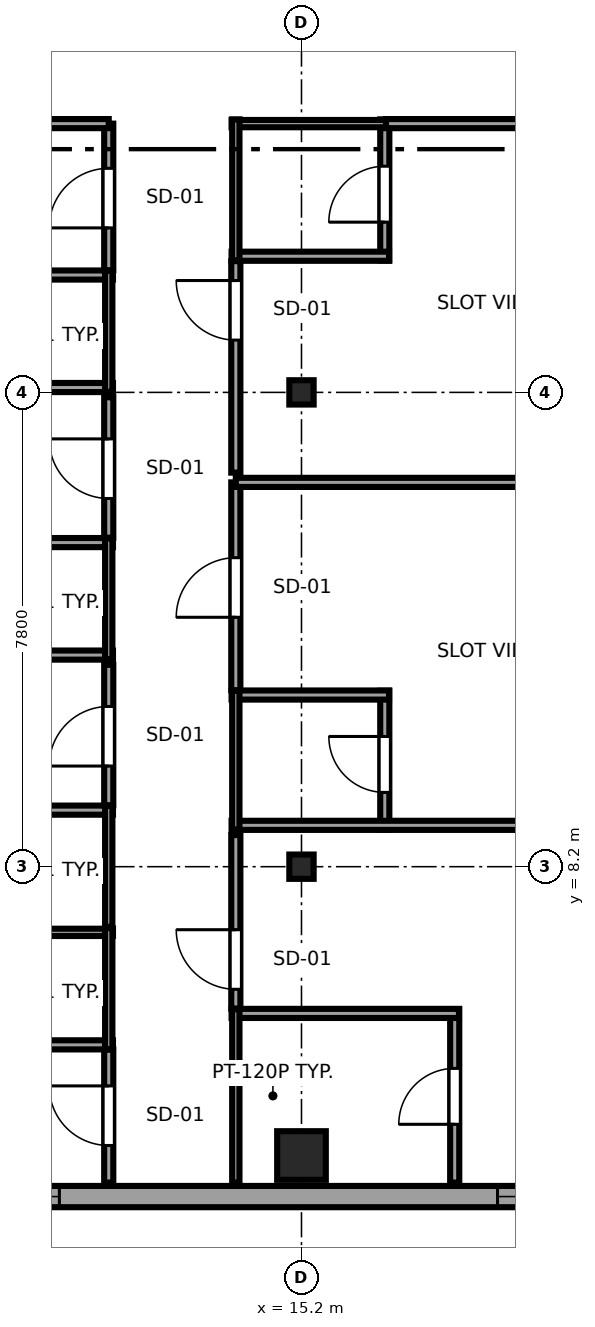
"""IFC4 building model, lengths in metres.
Left out: names, types, materials, properties, quantities, classifications, styles, units other than length and angle.
Written with IfcOpenShell. Run it as: python <this file> out.ifc"""

import sys

from ifc_helpers import new_model, si_unit, direction, frame, frame_2d, origin, origin_2d, place, context, subcontext, project, spatial, rectangle, i_section, extrude, source, transform, mapped, element, fill, save


model = new_model("IFC4")
c1 = context("Model", 3, precision=1e-05, world=origin(), true_north=direction((0.0, 1.0)))
c2 = subcontext(c1, "Body", "Model", "MODEL_VIEW")
j1 = project(units=[si_unit("LENGTHUNIT", "METRE"), si_unit("PLANEANGLEUNIT", "RADIAN")], contexts=[c1])
p1 = place(None, origin())
s1 = spatial("IfcSite", under=j1, at=p1, CompositionType="ELEMENT")
p2 = place(p1, origin())
s2 = spatial("IfcBuilding", under=s1, at=p2, CompositionType="ELEMENT")
p3 = place(p2, frame((0.0, 0.0, 187.55)))
s3 = spatial("IfcBuildingStorey", under=s2, at=p3, CompositionType="ELEMENT", Elevation=187.55)
m1 = source(origin(), c2, "Body", "SweptSolid", [
    extrude(rectangle(XDim=0.8, YDim=0.8, at=origin_2d()), origin(), (0.0, 0.0, 1.0), 3.55),
])
p4 = place(p3, frame((15.2, 3.45, 0.0), z_axis=(0.0, 0.0, 1.0), x_axis=(1.0, 0.0, 0.0)))
e1 = element("IfcColumn", 1, at=p4, inside=s3, PredefinedType="COLUMN", context=c2, shape_type="MappedRepresentation", body=[
    mapped(m1, transform((0.0, 0.0, 0.0), x_axis=(1.0, 0.0, 0.0), y_axis=(0.0, 1.0, 0.0), z_axis=(0.0, 0.0, 1.0), scale=1.0)),
])
m2 = source(origin(), c2, "Body", "SweptSolid", [
    extrude(i_section(OverallWidth=0.4, OverallDepth=0.4, WebThickness=0.02, FlangeThickness=0.035, at=origin_2d()), origin(), (0.0, 0.0, 1.0), 3.55),
])
for number, where, z_axis, x_axis in (
    (2, (15.2, 8.2, 0.0), (0.0, 0.0, 1.0), (1.0, 0.0, 0.0)),
    (3, (15.2, 16.0, 0.0), (0.0, 0.0, 1.0), (1.0, 0.0, 0.0)),
):
    element("IfcColumn", number, at=place(p3, frame(where, z_axis=z_axis, x_axis=x_axis)), inside=s3, PredefinedType="COLUMN", context=c2, shape_type="MappedRepresentation", body=[
        mapped(m2, transform((0.0, 0.0, 0.0), x_axis=(1.0, 0.0, 0.0), y_axis=(0.0, 1.0, 0.0), z_axis=(0.0, 0.0, 1.0), scale=1.0)),
    ])
p5 = place(p3, frame((7.017, 2.775, 0.0), z_axis=(0.0, 0.0, 1.0), x_axis=(1.0, 0.0, 0.0)))
e4 = element("IfcWall", 4, at=p5, inside=s3, PredefinedType="SOLIDWALL", context=c2, shape_type="SweptSolid", body=[
    extrude(rectangle(XDim=15.608, YDim=0.35, at=frame_2d((7.804, 0.0))), origin(), (0.0, 0.0, 1.0), 3.37),
])
p6 = place(p5, frame((1.801, 0.0, 0.68)))
e5 = element("IfcOpeningElement", 5, at=p6, cuts=e4, PredefinedType="OPENING", context=c2, shape_type="SweptSolid", body=[
    extrude(rectangle(XDim=2.4, YDim=1.9, at=frame_2d((1.2, 0.95))), frame((0.0, 0.185, 0.0), z_axis=(0.0, -1.0, 0.0), x_axis=(1.0, 0.0, 0.0)), (0.0, 0.0, 1.0), 0.37),
])
p7 = place(p5, frame((11.407, 0.0, 0.68)))
e6 = element("IfcOpeningElement", 6, at=p7, cuts=e4, PredefinedType="OPENING", context=c2, shape_type="SweptSolid", body=[
    extrude(rectangle(XDim=2.4, YDim=1.9, at=frame_2d((1.2, 0.95))), frame((0.0, 0.185, 0.0), z_axis=(0.0, -1.0, 0.0), x_axis=(1.0, 0.0, 0.0)), (0.0, 0.0, 1.0), 0.37),
])
p8 = place(p3, frame((9.51, 5.27, 0.0), z_axis=(0.0, 0.0, 1.0), x_axis=(1.0, 0.0, 0.0)))
e7 = element("IfcWall", 7, at=p8, inside=s3, PredefinedType="PARTITIONING", context=c2, shape_type="SweptSolid", body=[
    extrude(rectangle(XDim=2.59, YDim=0.15, at=frame_2d((1.295, 0.0))), origin(), (0.0, 0.0, 1.0), 3.37),
])
p9 = place(p3, frame((9.51, 7.12, 0.0), z_axis=(0.0, 0.0, 1.0), x_axis=(1.0, 0.0, 0.0)))
e8 = element("IfcWall", 8, at=p9, inside=s3, PredefinedType="PLUMBINGWALL", context=c2, shape_type="SweptSolid", body=[
    extrude(rectangle(XDim=2.59, YDim=0.12, at=frame_2d((1.295, 0.0))), origin(), (0.0, 0.0, 1.0), 3.37),
])
p10 = place(p3, frame((12.03, 5.2, 0.0), z_axis=(0.0, 0.0, 1.0), x_axis=(0.0, 1.0, 0.0)))
e9 = element("IfcWall", 9, at=p10, inside=s3, PredefinedType="PLUMBINGWALL", context=c2, shape_type="SweptSolid", body=[
    extrude(rectangle(XDim=1.99, YDim=0.12, at=frame_2d((0.995, 0.0))), origin(), (0.0, 0.0, 1.0), 3.37),
])
p11 = place(p3, frame((9.51, 9.13, 0.0), z_axis=(0.0, 0.0, 1.0), x_axis=(1.0, 0.0, 0.0)))
e10 = element("IfcWall", 10, at=p11, inside=s3, PredefinedType="PARTITIONING", context=c2, shape_type="SweptSolid", body=[
    extrude(rectangle(XDim=2.59, YDim=0.15, at=frame_2d((1.295, 0.0))), origin(), (0.0, 0.0, 1.0), 3.37),
])
p12 = place(p3, frame((12.03, 7.21, 0.0), z_axis=(0.0, 0.0, 1.0), x_axis=(0.0, 1.0, 0.0)))
e11 = element("IfcWall", 11, at=p12, inside=s3, PredefinedType="PLUMBINGWALL", context=c2, shape_type="SweptSolid", body=[
    extrude(rectangle(XDim=1.99, YDim=0.12, at=frame_2d((0.995, 0.0))), origin(), (0.0, 0.0, 1.0), 3.37),
])
p13 = place(p3, frame((3.005, 11.68, 0.0), z_axis=(0.0, 0.0, 1.0), x_axis=(1.0, 0.0, 0.0)))
e12 = element("IfcWall", 12, at=p13, inside=s3, PredefinedType="PARTITIONING", context=c2, shape_type="SweptSolid", body=[
    extrude(rectangle(XDim=9.095, YDim=0.15, at=frame_2d((4.548, 0.0))), origin(), (0.0, 0.0, 1.0), 3.37),
])
p14 = place(p3, frame((9.51, 13.53, 0.0), z_axis=(0.0, 0.0, 1.0), x_axis=(1.0, 0.0, 0.0)))
e13 = element("IfcWall", 13, at=p14, inside=s3, PredefinedType="PARTITIONING", context=c2, shape_type="SweptSolid", body=[
    extrude(rectangle(XDim=2.59, YDim=0.15, at=frame_2d((1.295, 0.0))), origin(), (0.0, 0.0, 1.0), 3.37),
])
p15 = place(p3, frame((12.03, 11.61, 0.0), z_axis=(0.0, 0.0, 1.0), x_axis=(0.0, 1.0, 0.0)))
e14 = element("IfcWall", 14, at=p15, inside=s3, PredefinedType="PLUMBINGWALL", context=c2, shape_type="SweptSolid", body=[
    extrude(rectangle(XDim=1.99, YDim=0.12, at=frame_2d((0.995, 0.0))), origin(), (0.0, 0.0, 1.0), 3.37),
])
p16 = place(p3, frame((3.005, 16.08, 0.0), z_axis=(0.0, 0.0, 1.0), x_axis=(1.0, 0.0, 0.0)))
e15 = element("IfcWall", 15, at=p16, inside=s3, PredefinedType="PARTITIONING", context=c2, shape_type="SweptSolid", body=[
    extrude(rectangle(XDim=9.095, YDim=0.15, at=frame_2d((4.548, 0.0))), origin(), (0.0, 0.0, 1.0), 2.758),
])
p17 = place(p3, frame((9.51, 17.93, 0.0), z_axis=(0.0, 0.0, 1.0), x_axis=(1.0, 0.0, 0.0)))
e16 = element("IfcWall", 16, at=p17, inside=s3, PredefinedType="PARTITIONING", context=c2, shape_type="SweptSolid", body=[
    extrude(rectangle(XDim=2.59, YDim=0.15, at=frame_2d((1.295, 0.0))), origin(), (0.0, 0.0, 1.0), 3.37),
])
p18 = place(p3, frame((12.03, 16.01, 0.0), z_axis=(0.0, 0.0, 1.0), x_axis=(0.0, 1.0, 0.0)))
e17 = element("IfcWall", 17, at=p18, inside=s3, PredefinedType="PLUMBINGWALL", context=c2, shape_type="SweptSolid", body=[
    extrude(rectangle(XDim=1.99, YDim=0.12, at=frame_2d((0.995, 0.0))), origin(), (0.0, 0.0, 1.0), 3.37),
])
p19 = place(p3, frame((17.72, 3.005, 0.0), z_axis=(0.0, 0.0, 1.0), x_axis=(0.0, 1.0, 0.0)))
e18 = element("IfcWall", 18, at=p19, inside=s3, PredefinedType="PARTITIONING", context=c2, shape_type="SweptSolid", body=[
    extrude(rectangle(XDim=2.852, YDim=0.15, at=frame_2d((1.426, 0.0))), origin(), (0.0, 0.0, 1.0), 3.37),
])
p20 = place(p19, frame((0.958, 0.0, 0.0)))
e19 = element("IfcOpeningElement", 19, at=p20, cuts=e18, PredefinedType="OPENING", context=c2, shape_type="SweptSolid", body=[
    extrude(rectangle(XDim=0.92, YDim=2.01, at=frame_2d((0.46, 1.005))), frame((0.0, 0.085, 0.0), z_axis=(0.0, -1.0, 0.0), x_axis=(1.0, 0.0, 0.0)), (0.0, 0.0, 1.0), 0.17),
])
p21 = place(p3, frame((14.05, 5.787, 0.0), z_axis=(0.0, 0.0, 1.0), x_axis=(1.0, 0.0, 0.0)))
e20 = element("IfcWall", 20, at=p21, inside=s3, PredefinedType="PARTITIONING", context=c2, shape_type="SweptSolid", body=[
    extrude(rectangle(XDim=3.74, YDim=0.15, at=frame_2d((1.87, 0.0))), origin(), (0.0, 0.0, 1.0), 3.37),
])
p22 = place(p3, frame((14.12, 3.005, 0.0), z_axis=(0.0, 0.0, 1.0), x_axis=(0.0, 1.0, 0.0)))
e21 = element("IfcWall", 21, at=p22, inside=s3, PredefinedType="PLUMBINGWALL", context=c2, shape_type="SweptSolid", body=[
    extrude(rectangle(XDim=2.852, YDim=0.12, at=frame_2d((1.426, 0.0))), origin(), (0.0, 0.0, 1.0), 3.37),
])
p23 = place(p3, frame((16.57, 8.81, 0.0), z_axis=(0.0, 0.0, 1.0), x_axis=(0.0, 1.0, 0.0)))
e22 = element("IfcWall", 22, at=p23, inside=s3, PredefinedType="PARTITIONING", context=c2, shape_type="SweptSolid", body=[
    extrude(rectangle(XDim=2.283, YDim=0.15, at=frame_2d((1.142, 0.0))), origin(), (0.0, 0.0, 1.0), 3.37),
])
p24 = place(p23, frame((0.612, 0.0, 0.0)))
e23 = element("IfcOpeningElement", 23, at=p24, cuts=e22, PredefinedType="OPENING", context=c2, shape_type="SweptSolid", body=[
    extrude(rectangle(XDim=0.92, YDim=2.01, at=frame_2d((0.46, 1.005))), frame((0.0, 0.085, 0.0), z_axis=(0.0, -1.0, 0.0), x_axis=(1.0, 0.0, 0.0)), (0.0, 0.0, 1.0), 0.17),
])
p25 = place(p3, frame((14.05, 8.88, 0.0), z_axis=(0.0, 0.0, 1.0), x_axis=(1.0, 0.0, 0.0)))
e24 = element("IfcWall", 24, at=p25, inside=s3, PredefinedType="PARTITIONING", context=c2, shape_type="SweptSolid", body=[
    extrude(rectangle(XDim=8.3, YDim=0.15, at=frame_2d((4.15, 0.0))), origin(), (0.0, 0.0, 1.0), 3.37),
])
p26 = place(p3, frame((14.05, 11.023, 0.0), z_axis=(0.0, 0.0, 1.0), x_axis=(1.0, 0.0, 0.0)))
e25 = element("IfcWall", 25, at=p26, inside=s3, PredefinedType="PARTITIONING", context=c2, shape_type="SweptSolid", body=[
    extrude(rectangle(XDim=2.59, YDim=0.15, at=frame_2d((1.295, 0.0))), origin(), (0.0, 0.0, 1.0), 3.37),
])
p27 = place(p3, frame((14.12, 8.81, 0.0), z_axis=(0.0, 0.0, 1.0), x_axis=(0.0, 1.0, 0.0)))
e26 = element("IfcWall", 26, at=p27, inside=s3, PredefinedType="PLUMBINGWALL", context=c2, shape_type="SweptSolid", body=[
    extrude(rectangle(XDim=2.283, YDim=0.12, at=frame_2d((1.142, 0.0))), origin(), (0.0, 0.0, 1.0), 3.37),
])
p28 = place(p3, frame((16.57, 18.169, 0.0), z_axis=(0.0, 0.0, 1.0), x_axis=(0.0, 1.0, 0.0)))
e27 = element("IfcWall", 27, at=p28, inside=s3, PredefinedType="PARTITIONING", context=c2, shape_type="SweptSolid", body=[
    extrude(rectangle(XDim=2.321, YDim=0.15, at=frame_2d((1.161, 0.0))), origin(), (0.0, 0.0, 1.0), 3.37),
])
p29 = place(p28, frame((0.631, 0.0, 0.0)))
e28 = element("IfcOpeningElement", 28, at=p29, cuts=e27, PredefinedType="OPENING", context=c2, shape_type="SweptSolid", body=[
    extrude(rectangle(XDim=0.92, YDim=2.01, at=frame_2d((0.46, 1.005))), frame((0.0, 0.085, 0.0), z_axis=(0.0, -1.0, 0.0), x_axis=(1.0, 0.0, 0.0)), (0.0, 0.0, 1.0), 0.17),
])
p30 = place(p3, frame((14.05, 18.239, 0.0), z_axis=(0.0, 0.0, 1.0), x_axis=(1.0, 0.0, 0.0)))
e29 = element("IfcWall", 29, at=p30, inside=s3, PredefinedType="PARTITIONING", context=c2, shape_type="SweptSolid", body=[
    extrude(rectangle(XDim=2.59, YDim=0.15, at=frame_2d((1.295, 0.0))), origin(), (0.0, 0.0, 1.0), 3.37),
])
p31 = place(p3, frame((14.05, 20.42, 0.0), z_axis=(0.0, 0.0, 1.0), x_axis=(1.0, 0.0, 0.0)))
e30 = element("IfcWall", 30, at=p31, inside=s3, PredefinedType="PLUMBINGWALL", context=c2, shape_type="SweptSolid", body=[
    extrude(rectangle(XDim=2.59, YDim=0.12, at=frame_2d((1.295, 0.0))), origin(), (0.0, 0.0, 1.0), 3.37),
])
p32 = place(p3, frame((14.12, 18.169, 0.0), z_axis=(0.0, 0.0, 1.0), x_axis=(0.0, 1.0, 0.0)))
e31 = element("IfcWall", 31, at=p32, inside=s3, PredefinedType="PLUMBINGWALL", context=c2, shape_type="SweptSolid", body=[
    extrude(rectangle(XDim=2.321, YDim=0.12, at=frame_2d((1.161, 0.0))), origin(), (0.0, 0.0, 1.0), 3.37),
])
p33 = place(p3, frame((12.03, 3.005, 0.0), z_axis=(0.0, 0.0, 1.0), x_axis=(0.0, 1.0, 0.0)))
e32 = element("IfcWall", 32, at=p33, inside=s3, PredefinedType="PARTITIONING", context=c2, shape_type="SweptSolid", body=[
    extrude(rectangle(XDim=2.185, YDim=0.15, at=frame_2d((1.093, 0.0))), origin(), (0.0, 0.0, 1.0), 3.37),
])
p34 = place(p33, frame((0.61, 0.0, 0.0)))
e33 = element("IfcOpeningElement", 33, at=p34, cuts=e32, PredefinedType="OPENING", context=c2, shape_type="SweptSolid", body=[
    extrude(rectangle(XDim=0.98, YDim=2.12, at=frame_2d((0.49, 1.06))), frame((0.0, 0.085, 0.0), z_axis=(0.0, -1.0, 0.0), x_axis=(1.0, 0.0, 0.0)), (0.0, 0.0, 1.0), 0.17),
])
p35 = place(p3, frame((12.03, 9.21, 0.0), z_axis=(0.0, 0.0, 1.0), x_axis=(0.0, 1.0, 0.0)))
e34 = element("IfcWall", 34, at=p35, inside=s3, PredefinedType="PARTITIONING", context=c2, shape_type="SweptSolid", body=[
    extrude(rectangle(XDim=2.31, YDim=0.15, at=frame_2d((1.155, 0.0))), origin(), (0.0, 0.0, 1.0), 3.37),
])
p36 = place(p35, frame((0.645, 0.0, 0.0)))
e35 = element("IfcOpeningElement", 35, at=p36, cuts=e34, PredefinedType="OPENING", context=c2, shape_type="SweptSolid", body=[
    extrude(rectangle(XDim=0.98, YDim=2.12, at=frame_2d((0.49, 1.06))), frame((0.0, 0.085, 0.0), z_axis=(0.0, -1.0, 0.0), x_axis=(1.0, 0.0, 0.0)), (0.0, 0.0, 1.0), 0.17),
])
p37 = place(p3, frame((12.03, 13.61, 0.0), z_axis=(0.0, 0.0, 1.0), x_axis=(0.0, 1.0, 0.0)))
e36 = element("IfcWall", 36, at=p37, inside=s3, PredefinedType="PARTITIONING", context=c2, shape_type="SweptSolid", body=[
    extrude(rectangle(XDim=2.31, YDim=0.15, at=frame_2d((1.155, 0.0))), origin(), (0.0, 0.0, 1.0), 3.37),
])
p38 = place(p37, frame((0.645, 0.0, 0.0)))
e37 = element("IfcOpeningElement", 37, at=p38, cuts=e36, PredefinedType="OPENING", context=c2, shape_type="SweptSolid", body=[
    extrude(rectangle(XDim=0.98, YDim=2.12, at=frame_2d((0.49, 1.06))), frame((0.0, 0.085, 0.0), z_axis=(0.0, -1.0, 0.0), x_axis=(1.0, 0.0, 0.0)), (0.0, 0.0, 1.0), 0.17),
])
p39 = place(p3, frame((12.03, 18.01, 0.0), z_axis=(0.0, 0.0, 1.0), x_axis=(0.0, 1.0, 0.0)))
e38 = element("IfcWall", 38, at=p39, inside=s3, PredefinedType="PARTITIONING", context=c2, shape_type="SweptSolid", body=[
    extrude(rectangle(XDim=2.41, YDim=0.15, at=frame_2d((1.205, 0.0))), origin(), (0.0, 0.0, 1.0), 3.37),
])
p40 = place(p39, frame((0.695, 0.0, 0.0)))
e39 = element("IfcOpeningElement", 39, at=p40, cuts=e38, PredefinedType="OPENING", context=c2, shape_type="SweptSolid", body=[
    extrude(rectangle(XDim=0.98, YDim=2.12, at=frame_2d((0.49, 1.06))), frame((0.0, 0.085, 0.0), z_axis=(0.0, -1.0, 0.0), x_axis=(1.0, 0.0, 0.0)), (0.0, 0.0, 1.0), 0.17),
])
p41 = place(p3, frame((3.005, 20.42, 0.0), z_axis=(0.0, 0.0, 1.0), x_axis=(1.0, 0.0, 0.0)))
e40 = element("IfcWall", 40, at=p41, inside=s3, PredefinedType="PARTITIONING", context=c2, shape_type="SweptSolid", body=[
    extrude(rectangle(XDim=9.025, YDim=0.15, at=frame_2d((4.513, 0.0))), origin(), (0.0, 0.0, 1.0), 3.37),
])
p42 = place(p3, frame((14.12, 5.867, 0.0), z_axis=(0.0, 0.0, 1.0), x_axis=(0.0, 1.0, 0.0)))
e41 = element("IfcWall", 41, at=p42, inside=s3, PredefinedType="PARTITIONING", context=c2, shape_type="SweptSolid", body=[
    extrude(rectangle(XDim=2.853, YDim=0.15, at=frame_2d((1.427, 0.0))), origin(), (0.0, 0.0, 1.0), 3.37),
])
p43 = place(p42, frame((0.316, 0.0, 0.0)))
e42 = element("IfcOpeningElement", 42, at=p43, cuts=e41, PredefinedType="OPENING", context=c2, shape_type="SweptSolid", body=[
    extrude(rectangle(XDim=0.98, YDim=2.12, at=frame_2d((0.49, 1.06))), frame((0.0, 0.085, 0.0), z_axis=(0.0, -1.0, 0.0), x_axis=(1.0, 0.0, 0.0)), (0.0, 0.0, 1.0), 0.17),
])
p44 = place(p3, frame((14.12, 11.103, 0.0), z_axis=(0.0, 0.0, 1.0), x_axis=(0.0, 1.0, 0.0)))
e43 = element("IfcWall", 43, at=p44, inside=s3, PredefinedType="PARTITIONING", context=c2, shape_type="SweptSolid", body=[
    extrude(rectangle(XDim=3.417, YDim=0.15, at=frame_2d((1.708, 0.0))), origin(), (0.0, 0.0, 1.0), 3.37),
])
p45 = place(p44, frame((1.198, 0.0, 0.0)))
e44 = element("IfcOpeningElement", 44, at=p45, cuts=e43, PredefinedType="OPENING", context=c2, shape_type="SweptSolid", body=[
    extrude(rectangle(XDim=0.98, YDim=2.12, at=frame_2d((0.49, 1.06))), frame((0.0, 0.085, 0.0), z_axis=(0.0, -1.0, 0.0), x_axis=(1.0, 0.0, 0.0)), (0.0, 0.0, 1.0), 0.17),
])
p46 = place(p3, frame((14.12, 14.52, 0.0), z_axis=(0.0, 0.0, 1.0), x_axis=(1.0, 0.0, 0.0)))
e45 = element("IfcWall", 45, at=p46, inside=s3, PredefinedType="PARTITIONING", context=c2, shape_type="SweptSolid", body=[
    extrude(rectangle(XDim=8.23, YDim=0.15, at=frame_2d((4.115, 0.0))), origin(), (0.0, 0.0, 1.0), 3.37),
])
p47 = place(p3, frame((14.12, 14.68, 0.0), z_axis=(0.0, 0.0, 1.0), x_axis=(0.0, 1.0, 0.0)))
e46 = element("IfcWall", 46, at=p47, inside=s3, PredefinedType="PARTITIONING", context=c2, shape_type="SweptSolid", body=[
    extrude(rectangle(XDim=3.479, YDim=0.15, at=frame_2d((1.74, 0.0))), origin(), (0.0, 0.0, 1.0), 3.37),
])
p48 = place(p47, frame((2.179, 0.0, 0.0)))
e47 = element("IfcOpeningElement", 47, at=p48, cuts=e46, PredefinedType="OPENING", context=c2, shape_type="SweptSolid", body=[
    extrude(rectangle(XDim=0.98, YDim=2.12, at=frame_2d((0.49, 1.06))), frame((0.0, 0.085, 0.0), z_axis=(0.0, -1.0, 0.0), x_axis=(1.0, 0.0, 0.0)), (0.0, 0.0, 1.0), 0.17),
])
p49 = place(p3, frame((16.59, 20.42, 0.0), z_axis=(0.0, 0.0, 1.0), x_axis=(1.0, 0.0, 0.0)))
e48 = element("IfcWall", 48, at=p49, inside=s3, PredefinedType="PARTITIONING", context=c2, shape_type="SweptSolid", body=[
    extrude(rectangle(XDim=5.76, YDim=0.15, at=frame_2d((2.88, 0.0))), origin(), (0.0, 0.0, 1.0), 3.37),
])
m3 = source(origin(), c2, "Body", "SweptSolid", [
    extrude(rectangle(XDim=2.4, YDim=1.9, at=frame_2d((1.2, 0.95))), frame((0.0, 0.09, 0.0), z_axis=(0.0, -1.0, 0.0), x_axis=(1.0, 0.0, 0.0)), (0.0, 0.0, 1.0), 0.06),
])
p50 = place(p6, origin())
e49 = element("IfcWindow", 49, at=p50, inside=s3, PartitioningType="TRIPLE_PANEL_HORIZONTAL", PredefinedType="WINDOW", context=c2, shape_type="MappedRepresentation", body=[
    mapped(m3, transform((0.0, 0.0, 0.0), x_axis=(1.0, 0.0, 0.0), y_axis=(0.0, 1.0, 0.0), z_axis=(0.0, 0.0, 1.0), scale=1.0)),
])
fill(e5, e49)
p51 = place(p7, origin())
e50 = element("IfcWindow", 50, at=p51, inside=s3, PartitioningType="TRIPLE_PANEL_HORIZONTAL", PredefinedType="WINDOW", context=c2, shape_type="MappedRepresentation", body=[
    mapped(m3, transform((0.0, 0.0, 0.0), x_axis=(1.0, 0.0, 0.0), y_axis=(0.0, 1.0, 0.0), z_axis=(0.0, 0.0, 1.0), scale=1.0)),
])
fill(e6, e50)
m4 = source(origin(), c2, "Body", "SweptSolid", [
    extrude(rectangle(XDim=0.92, YDim=2.01, at=frame_2d((0.46, 1.005))), frame((0.0, 0.025, 0.0), z_axis=(0.0, -1.0, 0.0), x_axis=(1.0, 0.0, 0.0)), (0.0, 0.0, 1.0), 0.05),
])
p52 = place(p20, origin())
e51 = element("IfcDoor", 51, at=p52, inside=s3, OperationType="SINGLE_SWING_LEFT", PredefinedType="DOOR", context=c2, shape_type="MappedRepresentation", body=[
    mapped(m4, transform((0.0, 0.0, 0.0), x_axis=(1.0, 0.0, 0.0), y_axis=(0.0, 1.0, 0.0), z_axis=(0.0, 0.0, 1.0), scale=1.0)),
])
fill(e19, e51)
p53 = place(p24, origin())
e52 = element("IfcDoor", 52, at=p53, inside=s3, OperationType="SINGLE_SWING_RIGHT", PredefinedType="DOOR", context=c2, shape_type="MappedRepresentation", body=[
    mapped(m4, transform((0.0, 0.0, 0.0), x_axis=(1.0, 0.0, 0.0), y_axis=(0.0, 1.0, 0.0), z_axis=(0.0, 0.0, 1.0), scale=1.0)),
])
fill(e23, e52)
p54 = place(p29, origin())
e53 = element("IfcDoor", 53, at=p54, inside=s3, OperationType="SINGLE_SWING_LEFT", PredefinedType="DOOR", context=c2, shape_type="MappedRepresentation", body=[
    mapped(m4, transform((0.0, 0.0, 0.0), x_axis=(1.0, 0.0, 0.0), y_axis=(0.0, 1.0, 0.0), z_axis=(0.0, 0.0, 1.0), scale=1.0)),
])
fill(e28, e53)
m5 = source(origin(), c2, "Body", "SweptSolid", [
    extrude(rectangle(XDim=0.98, YDim=2.12, at=frame_2d((0.49, 1.06))), frame((0.0, 0.025, 0.0), z_axis=(0.0, -1.0, 0.0), x_axis=(1.0, 0.0, 0.0)), (0.0, 0.0, 1.0), 0.05),
])
p55 = place(p34, origin())
e54 = element("IfcDoor", 54, at=p55, inside=s3, OperationType="SINGLE_SWING_RIGHT", PredefinedType="DOOR", context=c2, shape_type="MappedRepresentation", body=[
    mapped(m5, transform((0.0, 0.0, 0.0), x_axis=(1.0, 0.0, 0.0), y_axis=(0.0, 1.0, 0.0), z_axis=(0.0, 0.0, 1.0), scale=1.0)),
])
fill(e33, e54)
p56 = place(p36, origin())
e55 = element("IfcDoor", 55, at=p56, inside=s3, OperationType="SINGLE_SWING_LEFT", PredefinedType="DOOR", context=c2, shape_type="MappedRepresentation", body=[
    mapped(m5, transform((0.0, 0.0, 0.0), x_axis=(1.0, 0.0, 0.0), y_axis=(0.0, 1.0, 0.0), z_axis=(0.0, 0.0, 1.0), scale=1.0)),
])
fill(e35, e55)
p57 = place(p38, origin())
e56 = element("IfcDoor", 56, at=p57, inside=s3, OperationType="SINGLE_SWING_RIGHT", PredefinedType="DOOR", context=c2, shape_type="MappedRepresentation", body=[
    mapped(m5, transform((0.0, 0.0, 0.0), x_axis=(1.0, 0.0, 0.0), y_axis=(0.0, 1.0, 0.0), z_axis=(0.0, 0.0, 1.0), scale=1.0)),
])
fill(e37, e56)
p58 = place(p40, origin())
e57 = element("IfcDoor", 57, at=p58, inside=s3, OperationType="SINGLE_SWING_LEFT", PredefinedType="DOOR", context=c2, shape_type="MappedRepresentation", body=[
    mapped(m5, transform((0.0, 0.0, 0.0), x_axis=(1.0, 0.0, 0.0), y_axis=(0.0, 1.0, 0.0), z_axis=(0.0, 0.0, 1.0), scale=1.0)),
])
fill(e39, e57)
p59 = place(p43, origin())
e58 = element("IfcDoor", 58, at=p59, inside=s3, OperationType="SINGLE_SWING_RIGHT", PredefinedType="DOOR", context=c2, shape_type="MappedRepresentation", body=[
    mapped(m5, transform((0.0, 0.0, 0.0), x_axis=(1.0, 0.0, 0.0), y_axis=(0.0, 1.0, 0.0), z_axis=(0.0, 0.0, 1.0), scale=1.0)),
])
fill(e42, e58)
p60 = place(p45, origin())
e59 = element("IfcDoor", 59, at=p60, inside=s3, OperationType="SINGLE_SWING_LEFT", PredefinedType="DOOR", context=c2, shape_type="MappedRepresentation", body=[
    mapped(m5, transform((0.0, 0.0, 0.0), x_axis=(1.0, 0.0, 0.0), y_axis=(0.0, 1.0, 0.0), z_axis=(0.0, 0.0, 1.0), scale=1.0)),
])
fill(e44, e59)
p61 = place(p48, origin())
e60 = element("IfcDoor", 60, at=p61, inside=s3, OperationType="SINGLE_SWING_RIGHT", PredefinedType="DOOR", context=c2, shape_type="MappedRepresentation", body=[
    mapped(m5, transform((0.0, 0.0, 0.0), x_axis=(1.0, 0.0, 0.0), y_axis=(0.0, 1.0, 0.0), z_axis=(0.0, 0.0, 1.0), scale=1.0)),
])
fill(e47, e60)
save(model, sys.argv[1])
